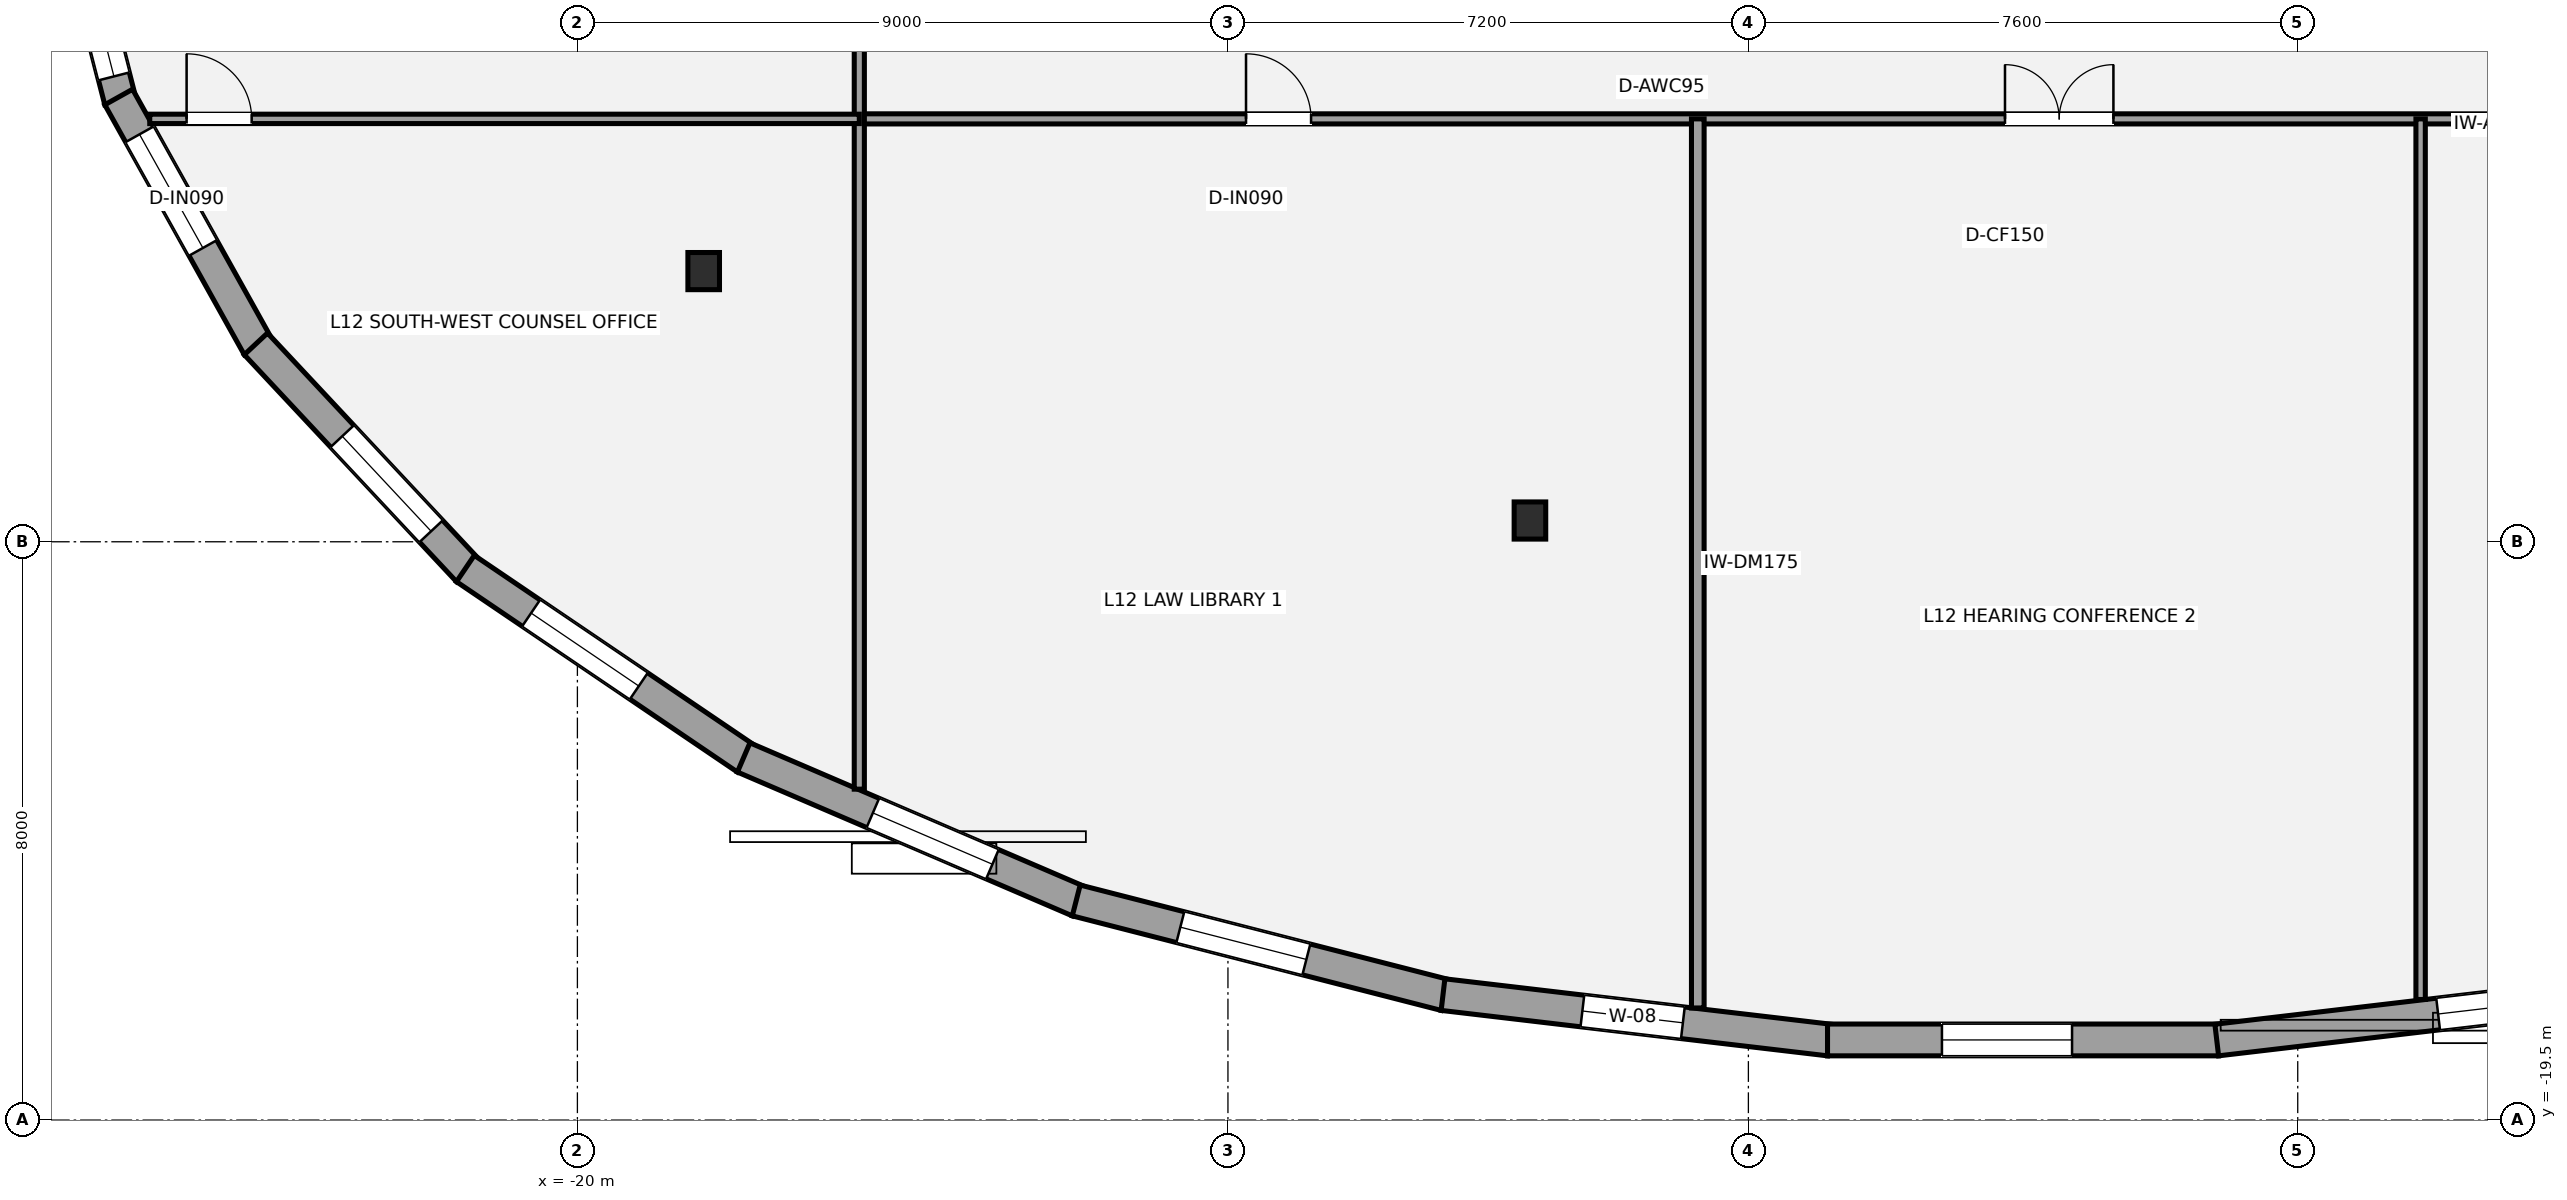
"""IFC4 building model, lengths in metres.
Left out: names, types, materials, properties, quantities, classifications, styles, units other than length and angle.
Written with IfcOpenShell. Run it as: python <this file> out.ifc"""

import sys

from ifc_helpers import new_model, si_unit, direction, frame, frame_2d, origin, origin_2d, place, context, subcontext, project, spatial, rectangle, i_section, extrude, element, fill, save


model = new_model("IFC4")
c1 = context("Model", 3, precision=1e-05, world=origin(), true_north=direction((0.0, 1.0)))
c2 = subcontext(c1, "Body", "Model", "MODEL_VIEW")
j1 = project(units=[si_unit("LENGTHUNIT", "METRE"), si_unit("PLANEANGLEUNIT", "RADIAN")], contexts=[c1])
p1 = place(None, origin())
s1 = spatial("IfcSite", under=j1, at=p1, CompositionType="ELEMENT")
p2 = place(p1, origin())
s2 = spatial("IfcBuilding", under=s1, at=p2, CompositionType="ELEMENT")
p3 = place(p2, frame((0.0, 0.0, 48.6)))
s3 = spatial("IfcBuildingStorey", under=s2, at=p3, CompositionType="ELEMENT", Elevation=48.6)
for number, where, z_axis, x_axis in (
    (1, (-18.253, -7.756, 0.0), (0.0, 0.0, 1.0), (1.0, 0.0, 0.0)),
    (2, (-6.822, -11.206, 0.0), (0.0, 0.0, 1.0), (1.0, 0.0, 0.0)),
):
    element("IfcColumn", number, at=place(p3, frame(where, z_axis=z_axis, x_axis=x_axis)), inside=s3, PredefinedType="COLUMN", context=c2, shape_type="SweptSolid", body=[
        extrude(i_section(OverallWidth=0.437, OverallDepth=0.514, WebThickness=0.061, FlangeThickness=0.097, at=origin_2d()), origin(), (0.0, 0.0, 1.0), 3.6),
    ])
p4 = place(p3, frame((-26.325, -5.4, 0.0), z_axis=(0.0, 0.0, 1.0), x_axis=(-0.248062710061, 0.968743976434, 0.0)))
e3 = element("IfcWall", 3, at=p4, inside=s3, PredefinedType="STANDARD", context=c2, shape_type="SweptSolid", body=[
    extrude(rectangle(XDim=3.739, YDim=0.44, at=frame_2d((1.87, 0.0))), origin(), (0.0, 0.0, 1.0), 2.529),
])
p5 = place(p4, frame((0.349, 0.0, 0.65)))
e4 = element("IfcOpeningElement", 4, at=p5, cuts=e3, PredefinedType="OPENING", context=c2, shape_type="SweptSolid", body=[
    extrude(rectangle(XDim=1.8, YDim=1.7, at=frame_2d((0.9, 0.85))), frame((0.0, 0.23, 0.0), z_axis=(0.0, -1.0, 0.0), x_axis=(1.0, 0.0, 0.0)), (0.0, 0.0, 1.0), 0.46),
])
p6 = place(p3, frame((-24.416, -8.806, 0.0), z_axis=(0.0, 0.0, 1.0), x_axis=(-0.487369438963, 0.873195871477, 0.0)))
e5 = element("IfcWall", 5, at=p6, inside=s3, PredefinedType="STANDARD", context=c2, shape_type="SweptSolid", body=[
    extrude(rectangle(XDim=3.96, YDim=0.44, at=frame_2d((1.98, 0.0))), origin(), (0.0, 0.0, 1.0), 2.529),
])
p7 = place(p6, frame((1.569, 0.0, 0.48)))
e6 = element("IfcOpeningElement", 6, at=p7, cuts=e5, PredefinedType="OPENING", context=c2, shape_type="SweptSolid", body=[
    extrude(rectangle(XDim=1.8, YDim=1.7, at=frame_2d((0.9, 0.85))), frame((0.0, 0.23, 0.0), z_axis=(0.0, -1.0, 0.0), x_axis=(1.0, 0.0, 0.0)), (0.0, 0.0, 1.0), 0.46),
])
p8 = place(p3, frame((-21.512, -11.902, 0.0), z_axis=(0.0, 0.0, 1.0), x_axis=(-0.68299392258, 0.730424056093, 0.0)))
e7 = element("IfcWall", 7, at=p8, inside=s3, PredefinedType="STANDARD", context=c2, shape_type="SweptSolid", body=[
    extrude(rectangle(XDim=4.298, YDim=0.44, at=frame_2d((2.149, 0.0))), origin(), (0.0, 0.0, 1.0), 2.529),
])
p9 = place(p8, frame((0.75, 0.0, 0.65)))
e8 = element("IfcOpeningElement", 8, at=p9, cuts=e7, PredefinedType="OPENING", context=c2, shape_type="SweptSolid", body=[
    extrude(rectangle(XDim=1.8, YDim=1.7, at=frame_2d((0.9, 0.85))), frame((0.0, 0.23, 0.0), z_axis=(0.0, -1.0, 0.0), x_axis=(1.0, 0.0, 0.0)), (0.0, 0.0, 1.0), 0.46),
])
p10 = place(p3, frame((-17.663, -14.504, 0.0), z_axis=(0.0, 0.0, 1.0), x_axis=(-0.827825981515, 0.560984976919, 0.0)))
e9 = element("IfcWall", 9, at=p10, inside=s3, PredefinedType="STANDARD", context=c2, shape_type="SweptSolid", body=[
    extrude(rectangle(XDim=4.695, YDim=0.44, at=frame_2d((2.347, 0.0))), origin(), (0.0, 0.0, 1.0), 2.529),
])
p11 = place(p10, frame((1.796, 0.0, 0.65)))
e10 = element("IfcOpeningElement", 10, at=p11, cuts=e9, PredefinedType="OPENING", context=c2, shape_type="SweptSolid", body=[
    extrude(rectangle(XDim=1.8, YDim=1.7, at=frame_2d((0.9, 0.85))), frame((0.0, 0.23, 0.0), z_axis=(0.0, -1.0, 0.0), x_axis=(1.0, 0.0, 0.0)), (0.0, 0.0, 1.0), 0.46),
])
p12 = place(p3, frame((-13.067, -16.473, 0.0), z_axis=(0.0, 0.0, 1.0), x_axis=(-0.918881850071, 0.394532819433, 0.0)))
e11 = element("IfcWall", 11, at=p12, inside=s3, PredefinedType="STANDARD", context=c2, shape_type="SweptSolid", body=[
    extrude(rectangle(XDim=5.042, YDim=0.44, at=frame_2d((2.521, 0.0))), origin(), (0.0, 0.0, 1.0), 2.529),
])
p13 = place(p12, frame((1.297, 0.0, 0.65)))
e12 = element("IfcOpeningElement", 12, at=p13, cuts=e11, PredefinedType="OPENING", context=c2, shape_type="SweptSolid", body=[
    extrude(rectangle(XDim=1.8, YDim=1.7, at=frame_2d((0.9, 0.85))), frame((0.0, 0.23, 0.0), z_axis=(0.0, -1.0, 0.0), x_axis=(1.0, 0.0, 0.0)), (0.0, 0.0, 1.0), 0.46),
])
p14 = place(p3, frame((-7.996, -17.77, 0.0), z_axis=(0.0, 0.0, 1.0), x_axis=(-0.968705592422, 0.248212560542, 0.0)))
e13 = element("IfcWall", 13, at=p14, inside=s3, PredefinedType="STANDARD", context=c2, shape_type="SweptSolid", body=[
    extrude(rectangle(XDim=5.268, YDim=0.44, at=frame_2d((2.634, 0.0))), origin(), (0.0, 0.0, 1.0), 2.529),
])
p15 = place(p14, frame((1.981, 0.0, 0.65)))
e14 = element("IfcOpeningElement", 14, at=p15, cuts=e13, PredefinedType="OPENING", context=c2, shape_type="SweptSolid", body=[
    extrude(rectangle(XDim=1.8, YDim=1.7, at=frame_2d((0.9, 0.85))), frame((0.0, 0.23, 0.0), z_axis=(0.0, -1.0, 0.0), x_axis=(1.0, 0.0, 0.0)), (0.0, 0.0, 1.0), 0.46),
])
p16 = place(p3, frame((-2.679, -18.393, 0.0), z_axis=(0.0, 0.0, 1.0), x_axis=(-0.993159890371, 0.116762289112, 0.0)))
e15 = element("IfcWall", 15, at=p16, inside=s3, PredefinedType="STANDARD", context=c2, shape_type="SweptSolid", body=[
    extrude(rectangle(XDim=5.382, YDim=0.44, at=frame_2d((2.691, 0.0))), origin(), (0.0, 0.0, 1.0), 2.529),
])
p17 = place(p16, frame((2.041, 0.0, 0.58)))
e16 = element("IfcOpeningElement", 16, at=p17, cuts=e15, PredefinedType="OPENING", context=c2, shape_type="SweptSolid", body=[
    extrude(rectangle(XDim=1.4, YDim=1.55, at=frame_2d((0.7, 0.775))), frame((0.0, 0.23, 0.0), z_axis=(0.0, -1.0, 0.0), x_axis=(1.0, 0.0, 0.0)), (0.0, 0.0, 1.0), 0.46),
])
p18 = place(p3, frame((2.705, -18.391, 0.0), z_axis=(0.0, 0.0, 1.0), x_axis=(-1.0, 0.0, 0.0)))
e17 = element("IfcWall", 17, at=p18, inside=s3, PredefinedType="STANDARD", context=c2, shape_type="SweptSolid", body=[
    extrude(rectangle(XDim=5.41, YDim=0.44, at=frame_2d((2.705, 0.0))), origin(), (0.0, 0.0, 1.0), 2.529),
])
p19 = place(p18, frame((2.028, 0.0, 0.65)))
e18 = element("IfcOpeningElement", 18, at=p19, cuts=e17, PredefinedType="OPENING", context=c2, shape_type="SweptSolid", body=[
    extrude(rectangle(XDim=1.8, YDim=1.7, at=frame_2d((0.9, 0.85))), frame((0.0, 0.23, 0.0), z_axis=(0.0, -1.0, 0.0), x_axis=(1.0, 0.0, 0.0)), (0.0, 0.0, 1.0), 0.46),
])
p20 = place(p3, frame((8.025, -17.764, 0.0), z_axis=(0.0, 0.0, 1.0), x_axis=(-0.993159890371, -0.116762289112, 0.0)))
e19 = element("IfcWall", 19, at=p20, inside=s3, PredefinedType="STANDARD", context=c2, shape_type="SweptSolid", body=[
    extrude(rectangle(XDim=5.382, YDim=0.44, at=frame_2d((2.691, 0.0))), origin(), (0.0, 0.0, 1.0), 2.529),
])
p21 = place(p20, frame((0.498, 0.0, 0.65)))
e20 = element("IfcOpeningElement", 20, at=p21, cuts=e19, PredefinedType="OPENING", context=c2, shape_type="SweptSolid", body=[
    extrude(rectangle(XDim=1.8, YDim=1.7, at=frame_2d((0.9, 0.85))), frame((0.0, 0.23, 0.0), z_axis=(0.0, -1.0, 0.0), x_axis=(1.0, 0.0, 0.0)), (0.0, 0.0, 1.0), 0.46),
])
p22 = place(p3, frame((-16.1, -5.65, 0.0), z_axis=(0.0, 0.0, 1.0), x_axis=(1.0, 0.0, 0.0)))
e21 = element("IfcWall", 21, at=p22, inside=s3, PredefinedType="PARTITIONING", context=c2, shape_type="SweptSolid", body=[
    extrude(rectangle(XDim=34.1, YDim=0.14, at=frame_2d((17.05, 0.0))), origin(), (0.0, 0.0, 1.0), 2.853),
])
p23 = place(p22, frame((5.35, 0.0, 0.0)))
e22 = element("IfcOpeningElement", 22, at=p23, cuts=e21, PredefinedType="OPENING", context=c2, shape_type="SweptSolid", body=[
    extrude(rectangle(XDim=0.9, YDim=2.1, at=frame_2d((0.45, 1.05))), frame((0.0, 0.08, 0.0), z_axis=(0.0, -1.0, 0.0), x_axis=(1.0, 0.0, 0.0)), (0.0, 0.0, 1.0), 0.16),
])
p24 = place(p22, frame((15.85, 0.0, 0.0)))
e23 = element("IfcOpeningElement", 23, at=p24, cuts=e21, PredefinedType="OPENING", context=c2, shape_type="SweptSolid", body=[
    extrude(rectangle(XDim=1.5, YDim=2.15, at=frame_2d((0.75, 1.075))), frame((0.0, 0.08, 0.0), z_axis=(0.0, -1.0, 0.0), x_axis=(1.0, 0.0, 0.0)), (0.0, 0.0, 1.0), 0.16),
])
p25 = place(p22, frame((27.4, 0.0, 0.0)))
e24 = element("IfcOpeningElement", 24, at=p25, cuts=e21, PredefinedType="OPENING", context=c2, shape_type="SweptSolid", body=[
    extrude(rectangle(XDim=0.9, YDim=2.1, at=frame_2d((0.45, 1.05))), frame((0.0, 0.08, 0.0), z_axis=(0.0, -1.0, 0.0), x_axis=(1.0, 0.0, 0.0)), (0.0, 0.0, 1.0), 0.16),
])
p26 = place(p3, frame((-16.1, -14.922, 0.0), z_axis=(0.0, 0.0, 1.0), x_axis=(0.0, 1.0, 0.0)))
e25 = element("IfcWall", 25, at=p26, inside=s3, PredefinedType="PARTITIONING", context=c2, shape_type="SweptSolid", body=[
    extrude(rectangle(XDim=20.772, YDim=0.14, at=frame_2d((10.386, 0.0))), origin(), (0.0, 0.0, 1.0), 2.841),
])
p27 = place(p26, frame((10.547, 0.0, 0.0)))
e26 = element("IfcOpeningElement", 26, at=p27, cuts=e25, PredefinedType="OPENING", context=c2, shape_type="SweptSolid", body=[
    extrude(rectangle(XDim=0.9, YDim=2.1, at=frame_2d((0.45, 1.05))), frame((0.0, 0.08, 0.0), z_axis=(0.0, -1.0, 0.0), x_axis=(1.0, 0.0, 0.0)), (0.0, 0.0, 1.0), 0.16),
])
p28 = place(p26, frame((14.472, 0.0, 0.0)))
e27 = element("IfcOpeningElement", 27, at=p28, cuts=e25, PredefinedType="OPENING", context=c2, shape_type="SweptSolid", body=[
    extrude(rectangle(XDim=0.9, YDim=2.1, at=frame_2d((0.45, 1.05))), frame((0.0, 0.08, 0.0), z_axis=(0.0, -1.0, 0.0), x_axis=(1.0, 0.0, 0.0)), (0.0, 0.0, 1.0), 0.16),
])
p29 = place(p26, frame((18.497, 0.0, 0.0)))
e28 = element("IfcOpeningElement", 28, at=p29, cuts=e25, PredefinedType="OPENING", context=c2, shape_type="SweptSolid", body=[
    extrude(rectangle(XDim=0.9, YDim=2.1, at=frame_2d((0.45, 1.05))), frame((0.0, 0.08, 0.0), z_axis=(0.0, -1.0, 0.0), x_axis=(1.0, 0.0, 0.0)), (0.0, 0.0, 1.0), 0.16),
])
p30 = place(p3, frame((-4.5, -17.949, 0.0), z_axis=(0.0, 0.0, 1.0), x_axis=(0.0, 1.0, 0.0)))
e29 = element("IfcWall", 29, at=p30, inside=s3, PredefinedType="PARTITIONING", context=c2, shape_type="SweptSolid", body=[
    extrude(rectangle(XDim=12.299, YDim=0.175, at=frame_2d((6.15, 0.0))), origin(), (0.0, 0.0, 1.0), 2.853),
])
p31 = place(p3, frame((5.5, -17.832, 0.0), z_axis=(0.0, 0.0, 1.0), x_axis=(0.0, 1.0, 0.0)))
e30 = element("IfcWall", 30, at=p31, inside=s3, PredefinedType="PARTITIONING", context=c2, shape_type="SweptSolid", body=[
    extrude(rectangle(XDim=12.182, YDim=0.13, at=frame_2d((6.091, 0.0))), origin(), (0.0, 0.0, 1.0), 3.4),
])
p32 = place(p3, frame((-25.917, -5.65, 0.0), z_axis=(0.0, 0.0, 1.0), x_axis=(1.0, 0.0, 0.0)))
e31 = element("IfcWall", 31, at=p32, inside=s3, PredefinedType="PARTITIONING", context=c2, shape_type="SweptSolid", body=[
    extrude(rectangle(XDim=9.816, YDim=0.13, at=frame_2d((4.908, 0.0))), origin(), (0.0, 0.0, 1.0), 2.779),
])
p33 = place(p32, frame((0.51, 0.0, 0.0)))
e32 = element("IfcOpeningElement", 32, at=p33, cuts=e31, PredefinedType="OPENING", context=c2, shape_type="SweptSolid", body=[
    extrude(rectangle(XDim=0.9, YDim=2.1, at=frame_2d((0.45, 1.05))), frame((0.0, 0.075, 0.0), z_axis=(0.0, -1.0, 0.0), x_axis=(1.0, 0.0, 0.0)), (0.0, 0.0, 1.0), 0.15),
])
p34 = place(p5, origin())
e33 = element("IfcWindow", 33, at=p34, inside=s3, PartitioningType="SINGLE_PANEL", PredefinedType="WINDOW", context=c2, shape_type="SweptSolid", body=[
    extrude(rectangle(XDim=1.8, YDim=1.7, at=frame_2d((0.9, 0.85))), frame((0.0, -0.01, 0.0), z_axis=(0.0, -1.0, 0.0), x_axis=(1.0, 0.0, 0.0)), (0.0, 0.0, 1.0), 0.06),
])
fill(e4, e33)
p35 = place(p7, origin())
e34 = element("IfcWindow", 34, at=p35, inside=s3, PartitioningType="SINGLE_PANEL", PredefinedType="WINDOW", context=c2, shape_type="SweptSolid", body=[
    extrude(rectangle(XDim=1.8, YDim=1.7, at=frame_2d((0.9, 0.85))), frame((0.0, -0.01, 0.0), z_axis=(0.0, -1.0, 0.0), x_axis=(1.0, 0.0, 0.0)), (0.0, 0.0, 1.0), 0.06),
])
fill(e6, e34)
p36 = place(p9, origin())
e35 = element("IfcWindow", 35, at=p36, inside=s3, PartitioningType="SINGLE_PANEL", PredefinedType="WINDOW", context=c2, shape_type="SweptSolid", body=[
    extrude(rectangle(XDim=1.8, YDim=1.7, at=frame_2d((0.9, 0.85))), frame((0.0, -0.01, 0.0), z_axis=(0.0, -1.0, 0.0), x_axis=(1.0, 0.0, 0.0)), (0.0, 0.0, 1.0), 0.06),
])
fill(e8, e35)
p37 = place(p11, origin())
e36 = element("IfcWindow", 36, at=p37, inside=s3, PartitioningType="SINGLE_PANEL", PredefinedType="WINDOW", context=c2, shape_type="SweptSolid", body=[
    extrude(rectangle(XDim=1.8, YDim=1.7, at=frame_2d((0.9, 0.85))), frame((0.0, -0.01, 0.0), z_axis=(0.0, -1.0, 0.0), x_axis=(1.0, 0.0, 0.0)), (0.0, 0.0, 1.0), 0.06),
])
fill(e10, e36)
p38 = place(p13, origin())
e37 = element("IfcWindow", 37, at=p38, inside=s3, PartitioningType="SINGLE_PANEL", PredefinedType="WINDOW", context=c2, shape_type="SweptSolid", body=[
    extrude(rectangle(XDim=1.8, YDim=1.7, at=frame_2d((0.9, 0.85))), frame((0.0, -0.01, 0.0), z_axis=(0.0, -1.0, 0.0), x_axis=(1.0, 0.0, 0.0)), (0.0, 0.0, 1.0), 0.06),
])
fill(e12, e37)
p39 = place(p15, origin())
e38 = element("IfcWindow", 38, at=p39, inside=s3, PartitioningType="SINGLE_PANEL", PredefinedType="WINDOW", context=c2, shape_type="SweptSolid", body=[
    extrude(rectangle(XDim=1.8, YDim=1.7, at=frame_2d((0.9, 0.85))), frame((0.0, -0.01, 0.0), z_axis=(0.0, -1.0, 0.0), x_axis=(1.0, 0.0, 0.0)), (0.0, 0.0, 1.0), 0.06),
])
fill(e14, e38)
p40 = place(p17, origin())
e39 = element("IfcWindow", 39, at=p40, inside=s3, PartitioningType="SINGLE_PANEL", PredefinedType="WINDOW", context=c2, shape_type="SweptSolid", body=[
    extrude(rectangle(XDim=1.4, YDim=1.55, at=frame_2d((0.7, 0.775))), frame((0.0, -0.01, 0.0), z_axis=(0.0, -1.0, 0.0), x_axis=(1.0, 0.0, 0.0)), (0.0, 0.0, 1.0), 0.06),
])
fill(e16, e39)
p41 = place(p19, origin())
e40 = element("IfcWindow", 40, at=p41, inside=s3, PartitioningType="SINGLE_PANEL", PredefinedType="WINDOW", context=c2, shape_type="SweptSolid", body=[
    extrude(rectangle(XDim=1.8, YDim=1.7, at=frame_2d((0.9, 0.85))), frame((0.0, -0.01, 0.0), z_axis=(0.0, -1.0, 0.0), x_axis=(1.0, 0.0, 0.0)), (0.0, 0.0, 1.0), 0.06),
])
fill(e18, e40)
p42 = place(p21, origin())
e41 = element("IfcWindow", 41, at=p42, inside=s3, PartitioningType="SINGLE_PANEL", PredefinedType="WINDOW", context=c2, shape_type="SweptSolid", body=[
    extrude(rectangle(XDim=1.8, YDim=1.7, at=frame_2d((0.9, 0.85))), frame((0.0, -0.01, 0.0), z_axis=(0.0, -1.0, 0.0), x_axis=(1.0, 0.0, 0.0)), (0.0, 0.0, 1.0), 0.06),
])
fill(e20, e41)
p43 = place(p23, origin())
e42 = element("IfcDoor", 42, at=p43, inside=s3, OperationType="SINGLE_SWING_LEFT", PredefinedType="DOOR", context=c2, shape_type="SweptSolid", body=[
    extrude(rectangle(XDim=0.9, YDim=2.1, at=frame_2d((0.45, 1.05))), frame((0.0, 0.025, 0.0), z_axis=(0.0, -1.0, 0.0), x_axis=(1.0, 0.0, 0.0)), (0.0, 0.0, 1.0), 0.05),
])
fill(e22, e42)
p44 = place(p24, origin())
e43 = element("IfcDoor", 43, at=p44, inside=s3, OperationType="DOUBLE_DOOR_SINGLE_SWING", PredefinedType="DOOR", context=c2, shape_type="SweptSolid", body=[
    extrude(rectangle(XDim=1.5, YDim=2.15, at=frame_2d((0.75, 1.075))), frame((0.0, 0.025, 0.0), z_axis=(0.0, -1.0, 0.0), x_axis=(1.0, 0.0, 0.0)), (0.0, 0.0, 1.0), 0.05),
])
fill(e23, e43)
p45 = place(p33, origin())
e44 = element("IfcDoor", 44, at=p45, inside=s3, OperationType="SINGLE_SWING_LEFT", PredefinedType="DOOR", context=c2, shape_type="SweptSolid", body=[
    extrude(rectangle(XDim=0.9, YDim=2.1, at=frame_2d((0.45, 1.05))), frame((0.0, 0.025, 0.0), z_axis=(0.0, -1.0, 0.0), x_axis=(1.0, 0.0, 0.0)), (0.0, 0.0, 1.0), 0.05),
])
fill(e32, e44)
save(model, sys.argv[1])
